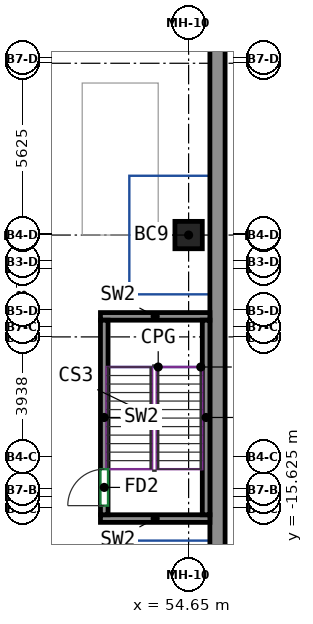
"""IFC4 building model, lengths in metres.
Left out: names, types, materials, properties, quantities, classifications, styles, units other than length and angle.
Written with IfcOpenShell. Run it as: python <this file> out.ifc"""

import sys

from ifc_helpers import new_model, si_unit, direction, frame, frame_2d, origin, origin_2d, place, context, subcontext, project, spatial, rectangle, extrude, source, transform, mapped, element, fill, save


model = new_model("IFC4")
c1 = context("Model", 3, precision=1e-05, world=origin(), true_north=direction((0.0, 1.0)))
c2 = subcontext(c1, "Body", "Model", "MODEL_VIEW")
j1 = project(units=[si_unit("LENGTHUNIT", "METRE"), si_unit("PLANEANGLEUNIT", "RADIAN")], contexts=[c1])
p1 = place(None, origin())
s1 = spatial("IfcSite", under=j1, at=p1, CompositionType="ELEMENT")
p2 = place(p1, origin())
s2 = spatial("IfcBuilding", under=s1, at=p2, CompositionType="ELEMENT")
p3 = place(p2, frame((0.0, 0.0, -9.0)))
s3 = spatial("IfcBuildingStorey", under=s2, at=p3, CompositionType="ELEMENT", Elevation=-9.0)
m1 = source(origin(), c2, "Body", "SweptSolid", [
    extrude(rectangle(XDim=0.9, YDim=0.9, at=origin_2d()), origin(), (0.0, 0.0, 1.0), 4.5),
])
p4 = place(p3, frame((54.65, -6.65, 0.0), z_axis=(0.0, 0.0, 1.0), x_axis=(1.0, 0.0, 0.0)))
e1 = element("IfcColumn", 1, at=p4, inside=s3, PredefinedType="COLUMN", context=c2, shape_type="MappedRepresentation", body=[
    mapped(m1, transform((0.0, 0.0, 0.0))),
])
m2 = source(origin(), c2, "Body", "SweptSolid", [
    extrude(rectangle(XDim=100.0, YDim=0.5, at=frame_2d((50.0, 0.0))), origin(), (0.0, 0.0, 1.0), 4.9),
])
p5 = place(p3, frame((55.6, -43.35, -0.4), z_axis=(0.0, 0.0, 1.0), x_axis=(0.0, 1.0, 0.0)))
e2 = element("IfcWall", 2, at=p5, inside=s3, PredefinedType="SOLIDWALL", context=c2, shape_type="MappedRepresentation", body=[
    mapped(m2, transform((0.0, 0.0, 0.0))),
])
m3 = source(origin(), c2, "Body", "SweptSolid", [
    extrude(rectangle(XDim=3.6, YDim=0.25, at=frame_2d((1.8, 0.0))), origin(), (0.0, 0.0, 1.0), 4.1),
])
for number, where, z_axis, x_axis in (
    (3, (51.75, -15.975, 0.0), (0.0, 0.0, 1.0), (1.0, 0.0, 0.0)),
    (4, (51.75, -9.325, 0.0), (0.0, 0.0, 1.0), (1.0, 0.0, 0.0)),
):
    element("IfcWall", number, at=place(p3, frame(where, z_axis=z_axis, x_axis=x_axis)), inside=s3, PredefinedType="SHEAR", context=c2, shape_type="MappedRepresentation", body=[
        mapped(m3, transform((0.0, 0.0, 0.0))),
    ])
m4 = source(origin(), c2, "Body", "SweptSolid", [
    extrude(rectangle(XDim=6.4, YDim=0.25, at=frame_2d((3.2, 0.0))), origin(), (0.0, 0.0, 1.0), 4.1),
])
p6 = place(p3, frame((51.875, -15.85, 0.0), z_axis=(0.0, 0.0, 1.0), x_axis=(0.0, 1.0, 0.0)))
e5 = element("IfcWall", 5, at=p6, inside=s3, PredefinedType="SHEAR", context=c2, shape_type="MappedRepresentation", body=[
    mapped(m4, transform((0.0, 0.0, 0.0))),
])
p7 = place(p6, frame((0.3, 0.0, 0.0)))
e6 = element("IfcOpeningElement", 6, at=p7, cuts=e5, PredefinedType="OPENING", context=c2, shape_type="SweptSolid", body=[
    extrude(rectangle(XDim=1.2, YDim=2.1, at=frame_2d((0.6, 1.05))), frame((0.0, 0.135, 0.0), z_axis=(0.0, -1.0, 0.0), x_axis=(1.0, 0.0, 0.0)), (0.0, 0.0, 1.0), 0.27),
])
p8 = place(p3, frame((55.225, -15.85, 0.0), z_axis=(0.0, 0.0, 1.0), x_axis=(0.0, 1.0, 0.0)))
e7 = element("IfcWall", 7, at=p8, inside=s3, PredefinedType="SHEAR", context=c2, shape_type="MappedRepresentation", body=[
    mapped(m4, transform((0.0, 0.0, 0.0))),
])
p9 = place(p7, origin())
e8 = element("IfcDoor", 8, at=p9, inside=s3, OperationType="SINGLE_SWING_LEFT", PredefinedType="DOOR", context=c2, shape_type="SweptSolid", body=[
    extrude(rectangle(XDim=1.2, YDim=2.1, at=frame_2d((0.6, 1.05))), frame((0.0, 0.025, 0.0), z_axis=(0.0, -1.0, 0.0), x_axis=(1.0, 0.0, 0.0)), (0.0, 0.0, 1.0), 0.05),
])
fill(e6, e8)
save(model, sys.argv[1])
